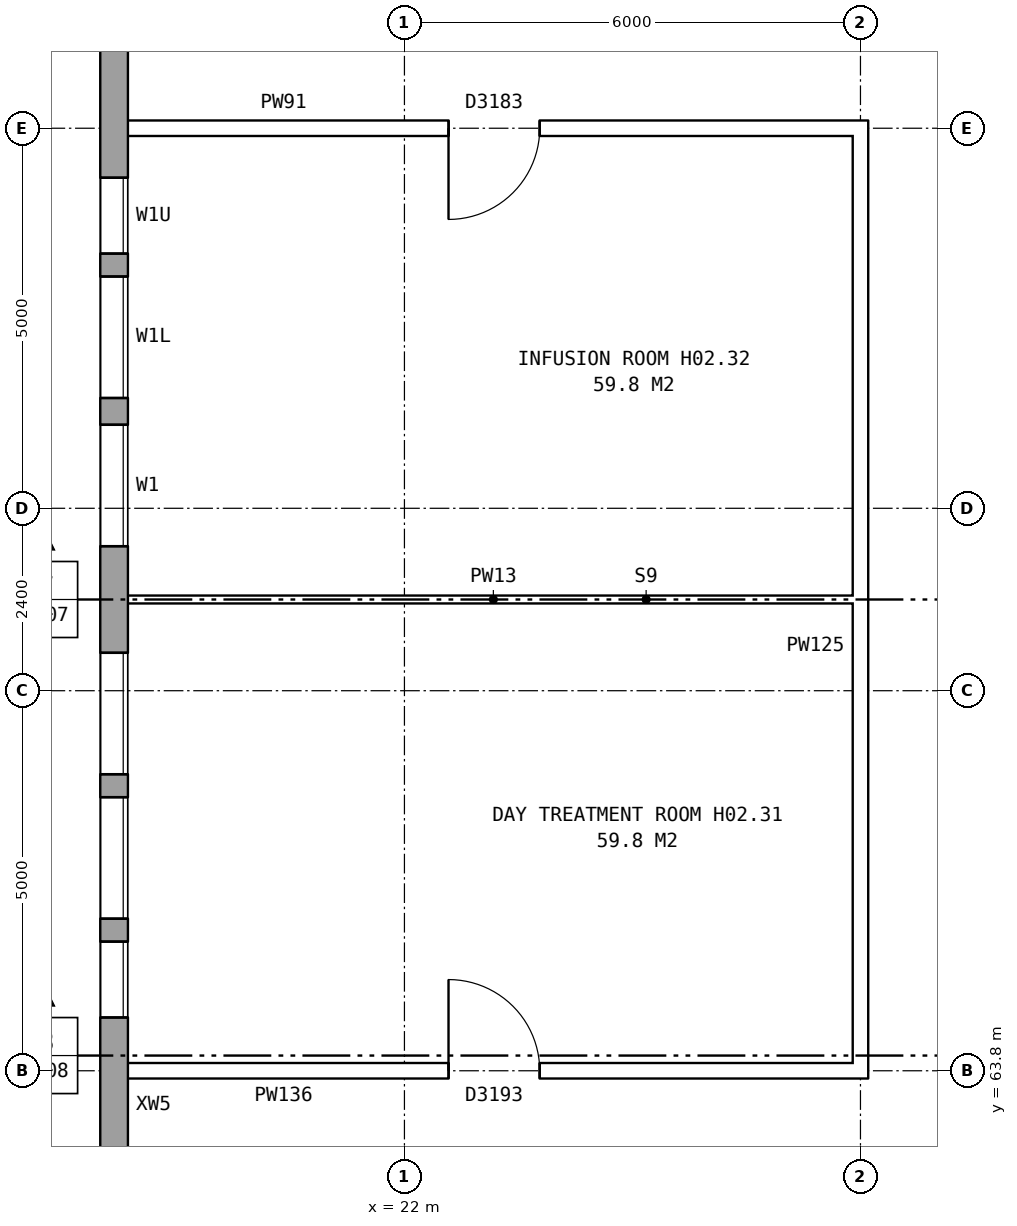
"""IFC4 building model, lengths in metres.
Left out: names, types, materials, properties, quantities, classifications, styles, units other than length and angle.
Written with IfcOpenShell. Run it as: python <this file> out.ifc"""

import sys

from ifc_helpers import new_model, si_unit, direction, frame, frame_2d, origin, place, context, subcontext, project, spatial, rectangle, extrude, element, fill, save


model = new_model("IFC4")
c1 = context("Model", 3, precision=1e-05, world=origin(), true_north=direction((0.0, 1.0)))
c2 = subcontext(c1, "Body", "Model", "MODEL_VIEW")
j1 = project(units=[si_unit("LENGTHUNIT", "METRE"), si_unit("PLANEANGLEUNIT", "RADIAN")], contexts=[c1])
p1 = place(None, origin())
s1 = spatial("IfcSite", under=j1, at=p1, CompositionType="ELEMENT")
p2 = place(p1, origin())
s2 = spatial("IfcBuilding", under=s1, at=p2, CompositionType="ELEMENT")
p3 = place(p2, frame((0.0, 0.0, 10.1)))
s3 = spatial("IfcBuildingStorey", under=s2, at=p3, CompositionType="ELEMENT", Elevation=10.1)
p4 = place(p3, frame((18.18, 82.925, 0.0), z_axis=(0.0, 0.0, 1.0), x_axis=(0.0, -1.0, 0.0)))
e1 = element("IfcWall", 1, at=p4, inside=s3, PredefinedType="STANDARD", context=c2, shape_type="SweptSolid", body=[
    extrude(rectangle(XDim=25.851, YDim=0.36, at=frame_2d((12.925, 0.0))), origin(), (0.0, 0.0, 1.0), 4.3),
])
p5 = place(p4, frame((0.3, 0.0, 0.8)))
e2 = element("IfcOpeningElement", 2, at=p5, cuts=e1, PredefinedType="OPENING", context=c2, shape_type="SweptSolid", body=[
    extrude(rectangle(XDim=1.4, YDim=1.8, at=frame_2d((0.7, 0.9))), frame((0.0, 0.19, 0.0), z_axis=(0.0, -1.0, 0.0), x_axis=(1.0, 0.0, 0.0)), (0.0, 0.0, 1.0), 0.38),
])
p6 = place(p4, frame((3.925, 0.0, 0.8)))
e3 = element("IfcOpeningElement", 3, at=p6, cuts=e1, PredefinedType="OPENING", context=c2, shape_type="SweptSolid", body=[
    extrude(rectangle(XDim=1.2, YDim=0.9, at=frame_2d((0.6, 0.45))), frame((0.0, 0.19, 0.0), z_axis=(0.0, -1.0, 0.0), x_axis=(1.0, 0.0, 0.0)), (0.0, 0.0, 1.0), 0.38),
])
p7 = place(p4, frame((7.375, 0.0, 1.7)))
e4 = element("IfcOpeningElement", 4, at=p7, cuts=e1, PredefinedType="OPENING", context=c2, shape_type="SweptSolid", body=[
    extrude(rectangle(XDim=1.0, YDim=0.9, at=frame_2d((0.5, 0.45))), frame((0.0, 0.19, 0.0), z_axis=(0.0, -1.0, 0.0), x_axis=(1.0, 0.0, 0.0)), (0.0, 0.0, 1.0), 0.38),
])
p8 = place(p4, frame((10.625, 0.0, 0.8)))
e5 = element("IfcOpeningElement", 5, at=p8, cuts=e1, PredefinedType="OPENING", context=c2, shape_type="SweptSolid", body=[
    extrude(rectangle(XDim=1.6, YDim=1.8, at=frame_2d((0.8, 0.9))), frame((0.0, 0.19, 0.0), z_axis=(0.0, -1.0, 0.0), x_axis=(1.0, 0.0, 0.0)), (0.0, 0.0, 1.0), 0.38),
])
p9 = place(p4, frame((13.625, 0.0, 0.8)))
e6 = element("IfcOpeningElement", 6, at=p9, cuts=e1, PredefinedType="OPENING", context=c2, shape_type="SweptSolid", body=[
    extrude(rectangle(XDim=1.6, YDim=1.8, at=frame_2d((0.8, 0.9))), frame((0.0, 0.19, 0.0), z_axis=(0.0, -1.0, 0.0), x_axis=(1.0, 0.0, 0.0)), (0.0, 0.0, 1.0), 0.38),
])
p10 = place(p4, frame((15.525, 0.0, 1.4)))
e7 = element("IfcOpeningElement", 7, at=p10, cuts=e1, PredefinedType="OPENING", context=c2, shape_type="SweptSolid", body=[
    extrude(rectangle(XDim=1.6, YDim=1.2, at=frame_2d((0.8, 0.6))), frame((0.0, 0.19, 0.0), z_axis=(0.0, -1.0, 0.0), x_axis=(1.0, 0.0, 0.0)), (0.0, 0.0, 1.0), 0.38),
])
p11 = place(p4, frame((20.725, 0.0, 0.8)))
e8 = element("IfcOpeningElement", 8, at=p11, cuts=e1, PredefinedType="OPENING", context=c2, shape_type="SweptSolid", body=[
    extrude(rectangle(XDim=1.2, YDim=0.9, at=frame_2d((0.6, 0.45))), frame((0.0, 0.19, 0.0), z_axis=(0.0, -1.0, 0.0), x_axis=(1.0, 0.0, 0.0)), (0.0, 0.0, 1.0), 0.38),
])
p12 = place(p4, frame((22.325, 0.0, 0.8)))
e9 = element("IfcOpeningElement", 9, at=p12, cuts=e1, PredefinedType="OPENING", context=c2, shape_type="SweptSolid", body=[
    extrude(rectangle(XDim=1.6, YDim=1.2, at=frame_2d((0.8, 0.6))), frame((0.0, 0.19, 0.0), z_axis=(0.0, -1.0, 0.0), x_axis=(1.0, 0.0, 0.0)), (0.0, 0.0, 1.0), 0.38),
])
p13 = place(p4, frame((2.0, 0.0, 0.8)))
e10 = element("IfcOpeningElement", 10, at=p13, cuts=e1, PredefinedType="OPENING", context=c2, shape_type="SweptSolid", body=[
    extrude(rectangle(XDim=0.8, YDim=1.5, at=frame_2d((0.4, 0.75))), frame((0.0, 0.19, 0.0), z_axis=(0.0, -1.0, 0.0), x_axis=(1.0, 0.0, 0.0)), (0.0, 0.0, 1.0), 0.38),
])
p14 = place(p4, frame((8.675, 0.0, 1.4)))
e11 = element("IfcOpeningElement", 11, at=p14, cuts=e1, PredefinedType="OPENING", context=c2, shape_type="SweptSolid", body=[
    extrude(rectangle(XDim=1.6, YDim=1.2, at=frame_2d((0.8, 0.6))), frame((0.0, 0.19, 0.0), z_axis=(0.0, -1.0, 0.0), x_axis=(1.0, 0.0, 0.0)), (0.0, 0.0, 1.0), 0.38),
])
p15 = place(p4, frame((17.425, 0.0, 1.7)))
e12 = element("IfcOpeningElement", 12, at=p15, cuts=e1, PredefinedType="OPENING", context=c2, shape_type="SweptSolid", body=[
    extrude(rectangle(XDim=1.0, YDim=0.9, at=frame_2d((0.5, 0.45))), frame((0.0, 0.19, 0.0), z_axis=(0.0, -1.0, 0.0), x_axis=(1.0, 0.0, 0.0)), (0.0, 0.0, 1.0), 0.38),
])
p16 = place(p4, frame((24.225, 0.0, 0.8)))
e13 = element("IfcOpeningElement", 13, at=p16, cuts=e1, PredefinedType="OPENING", context=c2, shape_type="SweptSolid", body=[
    extrude(rectangle(XDim=1.0, YDim=1.8, at=frame_2d((0.5, 0.9))), frame((0.0, 0.19, 0.0), z_axis=(0.0, -1.0, 0.0), x_axis=(1.0, 0.0, 0.0)), (0.0, 0.0, 1.0), 0.38),
])
p17 = place(p3, frame((18.24, 63.8, 0.0), z_axis=(0.0, 0.0, 1.0), x_axis=(1.0, 0.0, 0.0)))
e14 = element("IfcWall", 14, at=p17, inside=s3, PredefinedType="PARTITIONING", context=c2, shape_type="SweptSolid", body=[
    extrude(rectangle(XDim=9.86, YDim=0.2, at=frame_2d((4.93, 0.0))), origin(), (0.0, 0.0, 1.0), 4.3),
])
p18 = place(p17, frame((4.34, 0.0, 0.0)))
e15 = element("IfcOpeningElement", 15, at=p18, cuts=e14, PredefinedType="OPENING", context=c2, shape_type="SweptSolid", body=[
    extrude(rectangle(XDim=1.2, YDim=2.1, at=frame_2d((0.6, 1.05))), frame((0.0, 0.11, 0.0), z_axis=(0.0, -1.0, 0.0), x_axis=(1.0, 0.0, 0.0)), (0.0, 0.0, 1.0), 0.22),
])
p19 = place(p3, frame((18.24, 70.0, 0.0), z_axis=(0.0, 0.0, 1.0), x_axis=(1.0, 0.0, 0.0)))
e16 = element("IfcWall", 16, at=p19, inside=s3, PredefinedType="PARTITIONING", context=c2, shape_type="SweptSolid", body=[
    extrude(rectangle(XDim=9.86, YDim=0.1, at=frame_2d((4.93, 0.0))), origin(), (0.0, 0.0, 1.0), 4.3),
])
p20 = place(p3, frame((18.24, 76.2, 0.0), z_axis=(0.0, 0.0, 1.0), x_axis=(1.0, 0.0, 0.0)))
e17 = element("IfcWall", 17, at=p20, inside=s3, PredefinedType="PARTITIONING", context=c2, shape_type="SweptSolid", body=[
    extrude(rectangle(XDim=9.86, YDim=0.2, at=frame_2d((4.93, 0.0))), origin(), (0.0, 0.0, 1.0), 4.3),
])
p21 = place(p20, frame((4.34, 0.0, 0.0)))
e18 = element("IfcOpeningElement", 18, at=p21, cuts=e17, PredefinedType="OPENING", context=c2, shape_type="SweptSolid", body=[
    extrude(rectangle(XDim=1.2, YDim=2.1, at=frame_2d((0.6, 1.05))), frame((0.0, 0.11, 0.0), z_axis=(0.0, -1.0, 0.0), x_axis=(1.0, 0.0, 0.0)), (0.0, 0.0, 1.0), 0.22),
])
p22 = place(p3, frame((28.0, 63.7, 0.0), z_axis=(0.0, 0.0, 1.0), x_axis=(0.0, 1.0, 0.0)))
e19 = element("IfcWall", 19, at=p22, inside=s3, PredefinedType="PARTITIONING", context=c2, shape_type="SweptSolid", body=[
    extrude(rectangle(XDim=12.6, YDim=0.2, at=frame_2d((6.3, 0.0))), origin(), (0.0, 0.0, 1.0), 4.3),
])
p23 = place(p7, origin())
e20 = element("IfcWindow", 20, at=p23, inside=s3, PartitioningType="SINGLE_PANEL", PredefinedType="WINDOW", context=c2, shape_type="SweptSolid", body=[
    extrude(rectangle(XDim=1.0, YDim=0.9, at=frame_2d((0.5, 0.45))), frame((0.0, 0.15, 0.0), z_axis=(0.0, -1.0, 0.0), x_axis=(1.0, 0.0, 0.0)), (0.0, 0.0, 1.0), 0.06),
])
fill(e4, e20)
p24 = place(p8, origin())
e21 = element("IfcWindow", 21, at=p24, inside=s3, PartitioningType="SINGLE_PANEL", PredefinedType="WINDOW", context=c2, shape_type="SweptSolid", body=[
    extrude(rectangle(XDim=1.6, YDim=1.8, at=frame_2d((0.8, 0.9))), frame((0.0, 0.15, 0.0), z_axis=(0.0, -1.0, 0.0), x_axis=(1.0, 0.0, 0.0)), (0.0, 0.0, 1.0), 0.06),
])
fill(e5, e21)
p25 = place(p9, origin())
e22 = element("IfcWindow", 22, at=p25, inside=s3, PartitioningType="SINGLE_PANEL", PredefinedType="WINDOW", context=c2, shape_type="SweptSolid", body=[
    extrude(rectangle(XDim=1.6, YDim=1.8, at=frame_2d((0.8, 0.9))), frame((0.0, 0.15, 0.0), z_axis=(0.0, -1.0, 0.0), x_axis=(1.0, 0.0, 0.0)), (0.0, 0.0, 1.0), 0.06),
])
fill(e6, e22)
p26 = place(p10, origin())
e23 = element("IfcWindow", 23, at=p26, inside=s3, PartitioningType="SINGLE_PANEL", PredefinedType="WINDOW", context=c2, shape_type="SweptSolid", body=[
    extrude(rectangle(XDim=1.6, YDim=1.2, at=frame_2d((0.8, 0.6))), frame((0.0, 0.15, 0.0), z_axis=(0.0, -1.0, 0.0), x_axis=(1.0, 0.0, 0.0)), (0.0, 0.0, 1.0), 0.06),
])
fill(e7, e23)
p27 = place(p18, origin())
e24 = element("IfcDoor", 24, at=p27, inside=s3, OperationType="SINGLE_SWING_LEFT", PredefinedType="DOOR", context=c2, shape_type="SweptSolid", body=[
    extrude(rectangle(XDim=1.2, YDim=2.1, at=frame_2d((0.6, 1.05))), frame((0.0, 0.025, 0.0), z_axis=(0.0, -1.0, 0.0), x_axis=(1.0, 0.0, 0.0)), (0.0, 0.0, 1.0), 0.05),
])
fill(e15, e24)
p28 = place(p21, frame((1.2, 0.0, 0.0), z_axis=(0.0, 0.0, 1.0), x_axis=(-1.0, 0.0, 0.0)))
e25 = element("IfcDoor", 25, at=p28, inside=s3, OperationType="SINGLE_SWING_RIGHT", PredefinedType="DOOR", context=c2, shape_type="SweptSolid", body=[
    extrude(rectangle(XDim=1.2, YDim=2.1, at=frame_2d((0.6, 1.05))), frame((0.0, 0.025, 0.0), z_axis=(0.0, -1.0, 0.0), x_axis=(1.0, 0.0, 0.0)), (0.0, 0.0, 1.0), 0.05),
])
fill(e18, e25)
p29 = place(p14, origin())
e26 = element("IfcWindow", 26, at=p29, inside=s3, PartitioningType="SINGLE_PANEL", PredefinedType="WINDOW", context=c2, shape_type="SweptSolid", body=[
    extrude(rectangle(XDim=1.6, YDim=1.2, at=frame_2d((0.8, 0.6))), frame((0.0, 0.15, 0.0), z_axis=(0.0, -1.0, 0.0), x_axis=(1.0, 0.0, 0.0)), (0.0, 0.0, 1.0), 0.06),
])
fill(e11, e26)
p30 = place(p15, origin())
e27 = element("IfcWindow", 27, at=p30, inside=s3, PartitioningType="SINGLE_PANEL", PredefinedType="WINDOW", context=c2, shape_type="SweptSolid", body=[
    extrude(rectangle(XDim=1.0, YDim=0.9, at=frame_2d((0.5, 0.45))), frame((0.0, 0.15, 0.0), z_axis=(0.0, -1.0, 0.0), x_axis=(1.0, 0.0, 0.0)), (0.0, 0.0, 1.0), 0.06),
])
fill(e12, e27)
save(model, sys.argv[1])
